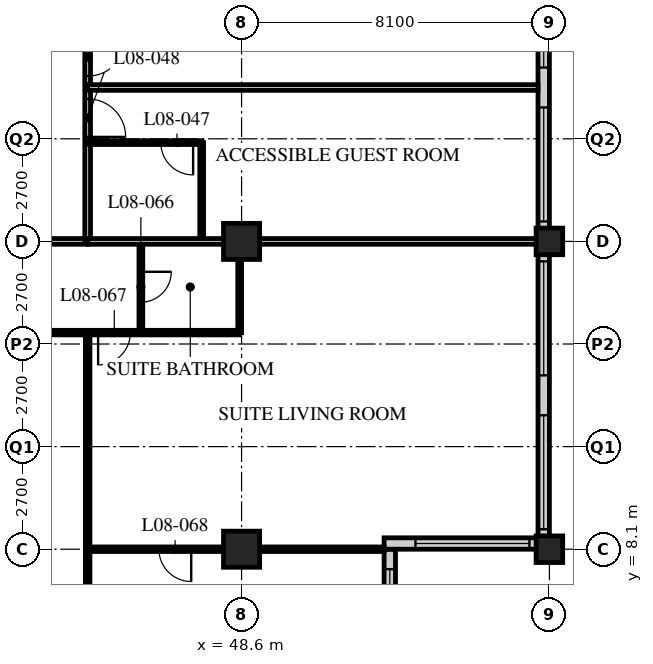
"""IFC4 building model, lengths in metres.
Left out: names, types, materials, properties, quantities, classifications, styles, units other than length and angle.
Written with IfcOpenShell. Run it as: python <this file> out.ifc"""

import sys

from ifc_helpers import new_model, si_unit, direction, frame, frame_2d, origin, origin_2d, place, context, subcontext, project, spatial, rectangle, hollow_rectangle, extrude, element, fill, save


model = new_model("IFC4")
c1 = context("Model", 3, precision=1e-05, world=origin(), true_north=direction((0.0, 1.0)))
c2 = subcontext(c1, "Body", "Model", "MODEL_VIEW")
j1 = project(units=[si_unit("LENGTHUNIT", "METRE"), si_unit("PLANEANGLEUNIT", "RADIAN")], contexts=[c1])
p1 = place(None, origin())
s1 = spatial("IfcSite", under=j1, at=p1, CompositionType="ELEMENT")
p2 = place(p1, origin())
s2 = spatial("IfcBuilding", under=s1, at=p2, CompositionType="ELEMENT")
p3 = place(p2, frame((0.0, 0.0, 39.8)))
s3 = spatial("IfcBuildingStorey", under=s2, at=p3, CompositionType="ELEMENT", Elevation=39.8)
for number, where, z_axis, x_axis in (
    (1, (48.6, 8.1, 0.0), (0.0, 0.0, 1.0), (1.0, 0.0, 0.0)),
    (2, (48.6, 16.2, 0.0), (0.0, 0.0, 1.0), (1.0, 0.0, 0.0)),
):
    element("IfcColumn", number, at=place(p3, frame(where, z_axis=z_axis, x_axis=x_axis)), inside=s3, PredefinedType="COLUMN", context=c2, shape_type="SweptSolid", body=[
        extrude(hollow_rectangle(XDim=0.95, YDim=0.95, WallThickness=0.095, at=origin_2d()), origin(), (0.0, 0.0, 1.0), 3.4),
    ])
for number, where, z_axis, x_axis in (
    (3, (56.7, 8.1, 0.0), (0.0, 0.0, 1.0), (1.0, 0.0, 0.0)),
    (4, (56.7, 16.2, 0.0), (0.0, 0.0, 1.0), (1.0, 0.0, 0.0)),
):
    element("IfcColumn", number, at=place(p3, frame(where, z_axis=z_axis, x_axis=x_axis)), inside=s3, PredefinedType="COLUMN", context=c2, shape_type="SweptSolid", body=[
        extrude(hollow_rectangle(XDim=0.7, YDim=0.7, WallThickness=0.06, at=origin_2d()), origin(), (0.0, 0.0, 1.0), 3.4),
    ])
p4 = place(p3, frame((52.5, 4.35, 0.0), z_axis=(0.0, 0.0, 1.0), x_axis=(0.0, 1.0, 0.0)))
e5 = element("IfcWall", 5, at=p4, inside=s3, PredefinedType="SOLIDWALL", context=c2, shape_type="SweptSolid", body=[
    extrude(rectangle(XDim=3.75, YDim=0.3, at=frame_2d((1.875, 0.0))), origin(), (0.0, 0.0, 1.0), 3.19),
])
p5 = place(p4, frame((0.225, 0.0, 0.9)))
e6 = element("IfcOpeningElement", 6, at=p5, cuts=e5, PredefinedType="OPENING", context=c2, shape_type="SweptSolid", body=[
    extrude(rectangle(XDim=3.0, YDim=1.5, at=frame_2d((1.5, 0.75))), frame((0.0, 0.16, 0.0), z_axis=(0.0, -1.0, 0.0), x_axis=(1.0, 0.0, 0.0)), (0.0, 0.0, 1.0), 0.32),
])
p6 = place(p3, frame((52.35, 8.25, 0.0), z_axis=(0.0, 0.0, 1.0), x_axis=(1.0, 0.0, 0.0)))
e7 = element("IfcWall", 7, at=p6, inside=s3, PredefinedType="SOLIDWALL", context=c2, shape_type="SweptSolid", body=[
    extrude(rectangle(XDim=4.35, YDim=0.3, at=frame_2d((2.175, 0.0))), origin(), (0.0, 0.0, 1.0), 3.19),
])
p7 = place(p6, frame((0.825, 0.0, 0.9)))
e8 = element("IfcOpeningElement", 8, at=p7, cuts=e7, PredefinedType="OPENING", context=c2, shape_type="SweptSolid", body=[
    extrude(rectangle(XDim=3.0, YDim=1.5, at=frame_2d((1.5, 0.75))), frame((0.0, 0.16, 0.0), z_axis=(0.0, -1.0, 0.0), x_axis=(1.0, 0.0, 0.0)), (0.0, 0.0, 1.0), 0.32),
])
p8 = place(p3, frame((56.55, 8.4, 0.0), z_axis=(0.0, 0.0, 1.0), x_axis=(0.0, 1.0, 0.0)))
e9 = element("IfcWall", 9, at=p8, inside=s3, PredefinedType="SOLIDWALL", context=c2, shape_type="SweptSolid", body=[
    extrude(rectangle(XDim=32.1, YDim=0.3, at=frame_2d((16.05, 0.0))), origin(), (0.0, 0.0, 1.0), 3.19),
])
p9 = place(p8, frame((0.225, 0.0, 0.9)))
e10 = element("IfcOpeningElement", 10, at=p9, cuts=e9, PredefinedType="OPENING", context=c2, shape_type="SweptSolid", body=[
    extrude(rectangle(XDim=3.0, YDim=2.0, at=frame_2d((1.5, 1.0))), frame((0.0, 0.16, 0.0), z_axis=(0.0, -1.0, 0.0), x_axis=(1.0, 0.0, 0.0)), (0.0, 0.0, 1.0), 0.32),
])
p10 = place(p8, frame((4.275, 0.0, 0.9)))
e11 = element("IfcOpeningElement", 11, at=p10, cuts=e9, PredefinedType="OPENING", context=c2, shape_type="SweptSolid", body=[
    extrude(rectangle(XDim=3.0, YDim=2.0, at=frame_2d((1.5, 1.0))), frame((0.0, 0.16, 0.0), z_axis=(0.0, -1.0, 0.0), x_axis=(1.0, 0.0, 0.0)), (0.0, 0.0, 1.0), 0.32),
])
p11 = place(p8, frame((8.325, 0.0, 0.9)))
e12 = element("IfcOpeningElement", 12, at=p11, cuts=e9, PredefinedType="OPENING", context=c2, shape_type="SweptSolid", body=[
    extrude(rectangle(XDim=3.0, YDim=2.0, at=frame_2d((1.5, 1.0))), frame((0.0, 0.16, 0.0), z_axis=(0.0, -1.0, 0.0), x_axis=(1.0, 0.0, 0.0)), (0.0, 0.0, 1.0), 0.32),
])
p12 = place(p8, frame((12.375, 0.0, 0.9)))
e13 = element("IfcOpeningElement", 13, at=p12, cuts=e9, PredefinedType="OPENING", context=c2, shape_type="SweptSolid", body=[
    extrude(rectangle(XDim=3.0, YDim=2.0, at=frame_2d((1.5, 1.0))), frame((0.0, 0.16, 0.0), z_axis=(0.0, -1.0, 0.0), x_axis=(1.0, 0.0, 0.0)), (0.0, 0.0, 1.0), 0.32),
])
p13 = place(p8, frame((16.425, 0.0, 0.9)))
e14 = element("IfcOpeningElement", 14, at=p13, cuts=e9, PredefinedType="OPENING", context=c2, shape_type="SweptSolid", body=[
    extrude(rectangle(XDim=3.0, YDim=2.0, at=frame_2d((1.5, 1.0))), frame((0.0, 0.16, 0.0), z_axis=(0.0, -1.0, 0.0), x_axis=(1.0, 0.0, 0.0)), (0.0, 0.0, 1.0), 0.32),
])
p14 = place(p8, frame((20.475, 0.0, 0.9)))
e15 = element("IfcOpeningElement", 15, at=p14, cuts=e9, PredefinedType="OPENING", context=c2, shape_type="SweptSolid", body=[
    extrude(rectangle(XDim=3.0, YDim=2.0, at=frame_2d((1.5, 1.0))), frame((0.0, 0.16, 0.0), z_axis=(0.0, -1.0, 0.0), x_axis=(1.0, 0.0, 0.0)), (0.0, 0.0, 1.0), 0.32),
])
p15 = place(p8, frame((24.525, 0.0, 0.9)))
e16 = element("IfcOpeningElement", 16, at=p15, cuts=e9, PredefinedType="OPENING", context=c2, shape_type="SweptSolid", body=[
    extrude(rectangle(XDim=3.0, YDim=2.0, at=frame_2d((1.5, 1.0))), frame((0.0, 0.16, 0.0), z_axis=(0.0, -1.0, 0.0), x_axis=(1.0, 0.0, 0.0)), (0.0, 0.0, 1.0), 0.32),
])
p16 = place(p8, frame((28.575, 0.0, 0.9)))
e17 = element("IfcOpeningElement", 17, at=p16, cuts=e9, PredefinedType="OPENING", context=c2, shape_type="SweptSolid", body=[
    extrude(rectangle(XDim=3.0, YDim=2.0, at=frame_2d((1.5, 1.0))), frame((0.0, 0.16, 0.0), z_axis=(0.0, -1.0, 0.0), x_axis=(1.0, 0.0, 0.0)), (0.0, 0.0, 1.0), 0.32),
])
p17 = place(p3, frame((12.15, 16.2, 0.0), z_axis=(0.0, 0.0, 1.0), x_axis=(1.0, 0.0, 0.0)))
e18 = element("IfcWall", 18, at=p17, inside=s3, PredefinedType="PARTITIONING", context=c2, shape_type="SweptSolid", body=[
    extrude(rectangle(XDim=32.4, YDim=0.15, at=frame_2d((16.2, 0.0))), origin(), (0.0, 0.0, 1.0), 2.578),
])
p18 = place(p17, frame((6.5, 0.0, 0.0)))
e19 = element("IfcOpeningElement", 19, at=p18, cuts=e18, PredefinedType="OPENING", context=c2, shape_type="SweptSolid", body=[
    extrude(rectangle(XDim=1.0, YDim=2.1, at=frame_2d((0.5, 1.05))), frame((0.0, 0.085, 0.0), z_axis=(0.0, -1.0, 0.0), x_axis=(1.0, 0.0, 0.0)), (0.0, 0.0, 1.0), 0.17),
])
p19 = place(p17, frame((8.4, 0.0, 0.0)))
e20 = element("IfcOpeningElement", 20, at=p19, cuts=e18, PredefinedType="OPENING", context=c2, shape_type="SweptSolid", body=[
    extrude(rectangle(XDim=1.0, YDim=2.1, at=frame_2d((0.5, 1.05))), frame((0.0, 0.085, 0.0), z_axis=(0.0, -1.0, 0.0), x_axis=(1.0, 0.0, 0.0)), (0.0, 0.0, 1.0), 0.17),
])
p20 = place(p17, frame((14.6, 0.0, 0.0)))
e21 = element("IfcOpeningElement", 21, at=p20, cuts=e18, PredefinedType="OPENING", context=c2, shape_type="SweptSolid", body=[
    extrude(rectangle(XDim=1.0, YDim=2.1, at=frame_2d((0.5, 1.05))), frame((0.0, 0.085, 0.0), z_axis=(0.0, -1.0, 0.0), x_axis=(1.0, 0.0, 0.0)), (0.0, 0.0, 1.0), 0.17),
])
p21 = place(p17, frame((16.5, 0.0, 0.0)))
e22 = element("IfcOpeningElement", 22, at=p21, cuts=e18, PredefinedType="OPENING", context=c2, shape_type="SweptSolid", body=[
    extrude(rectangle(XDim=1.0, YDim=2.1, at=frame_2d((0.5, 1.05))), frame((0.0, 0.085, 0.0), z_axis=(0.0, -1.0, 0.0), x_axis=(1.0, 0.0, 0.0)), (0.0, 0.0, 1.0), 0.17),
])
p22 = place(p17, frame((23.0, 0.0, 0.0)))
e23 = element("IfcOpeningElement", 23, at=p22, cuts=e18, PredefinedType="OPENING", context=c2, shape_type="SweptSolid", body=[
    extrude(rectangle(XDim=1.0, YDim=2.1, at=frame_2d((0.5, 1.05))), frame((0.0, 0.085, 0.0), z_axis=(0.0, -1.0, 0.0), x_axis=(1.0, 0.0, 0.0)), (0.0, 0.0, 1.0), 0.17),
])
p23 = place(p17, frame((24.6, 0.0, 0.0)))
e24 = element("IfcOpeningElement", 24, at=p23, cuts=e18, PredefinedType="OPENING", context=c2, shape_type="SweptSolid", body=[
    extrude(rectangle(XDim=1.0, YDim=2.1, at=frame_2d((0.5, 1.05))), frame((0.0, 0.085, 0.0), z_axis=(0.0, -1.0, 0.0), x_axis=(1.0, 0.0, 0.0)), (0.0, 0.0, 1.0), 0.17),
])
p24 = place(p17, frame((1.525, 0.0, 0.0)))
e25 = element("IfcOpeningElement", 25, at=p24, cuts=e18, PredefinedType="OPENING", context=c2, shape_type="SweptSolid", body=[
    extrude(rectangle(XDim=1.0, YDim=2.1, at=frame_2d((0.5, 1.05))), frame((0.0, 0.085, 0.0), z_axis=(0.0, -1.0, 0.0), x_axis=(1.0, 0.0, 0.0)), (0.0, 0.0, 1.0), 0.17),
])
p25 = place(p17, frame((29.875, 0.0, 0.0)))
e26 = element("IfcOpeningElement", 26, at=p25, cuts=e18, PredefinedType="OPENING", context=c2, shape_type="SweptSolid", body=[
    extrude(rectangle(XDim=1.0, YDim=2.1, at=frame_2d((0.5, 1.05))), frame((0.0, 0.085, 0.0), z_axis=(0.0, -1.0, 0.0), x_axis=(1.0, 0.0, 0.0)), (0.0, 0.0, 1.0), 0.17),
])
p26 = place(p3, frame((44.55, 16.2, 0.0), z_axis=(0.0, 0.0, 1.0), x_axis=(0.0, 1.0, 0.0)))
e27 = element("IfcWall", 27, at=p26, inside=s3, PredefinedType="PARTITIONING", context=c2, shape_type="SweptSolid", body=[
    extrude(rectangle(XDim=26.1, YDim=0.15, at=frame_2d((13.05, 0.0))), origin(), (0.0, 0.0, 1.0), 3.19),
])
p27 = place(p26, frame((2.75, 0.0, 0.0)))
e28 = element("IfcOpeningElement", 28, at=p27, cuts=e27, PredefinedType="OPENING", context=c2, shape_type="SweptSolid", body=[
    extrude(rectangle(XDim=1.0, YDim=2.1, at=frame_2d((0.5, 1.05))), frame((0.0, 0.085, 0.0), z_axis=(0.0, -1.0, 0.0), x_axis=(1.0, 0.0, 0.0)), (0.0, 0.0, 1.0), 0.17),
])
p28 = place(p26, frame((4.35, 0.0, 0.0)))
e29 = element("IfcOpeningElement", 29, at=p28, cuts=e27, PredefinedType="OPENING", context=c2, shape_type="SweptSolid", body=[
    extrude(rectangle(XDim=1.0, YDim=2.1, at=frame_2d((0.5, 1.05))), frame((0.0, 0.085, 0.0), z_axis=(0.0, -1.0, 0.0), x_axis=(1.0, 0.0, 0.0)), (0.0, 0.0, 1.0), 0.17),
])
p29 = place(p26, frame((8.4, 0.0, 0.0)))
e30 = element("IfcOpeningElement", 30, at=p29, cuts=e27, PredefinedType="OPENING", context=c2, shape_type="SweptSolid", body=[
    extrude(rectangle(XDim=1.0, YDim=2.1, at=frame_2d((0.5, 1.05))), frame((0.0, 0.085, 0.0), z_axis=(0.0, -1.0, 0.0), x_axis=(1.0, 0.0, 0.0)), (0.0, 0.0, 1.0), 0.17),
])
p30 = place(p26, frame((14.6, 0.0, 0.0)))
e31 = element("IfcOpeningElement", 31, at=p30, cuts=e27, PredefinedType="OPENING", context=c2, shape_type="SweptSolid", body=[
    extrude(rectangle(XDim=1.0, YDim=2.1, at=frame_2d((0.5, 1.05))), frame((0.0, 0.085, 0.0), z_axis=(0.0, -1.0, 0.0), x_axis=(1.0, 0.0, 0.0)), (0.0, 0.0, 1.0), 0.17),
])
p31 = place(p26, frame((18.65, 0.0, 0.0)))
e32 = element("IfcOpeningElement", 32, at=p31, cuts=e27, PredefinedType="OPENING", context=c2, shape_type="SweptSolid", body=[
    extrude(rectangle(XDim=1.0, YDim=2.1, at=frame_2d((0.5, 1.05))), frame((0.0, 0.085, 0.0), z_axis=(0.0, -1.0, 0.0), x_axis=(1.0, 0.0, 0.0)), (0.0, 0.0, 1.0), 0.17),
])
p32 = place(p26, frame((22.65, 0.0, 0.0)))
e33 = element("IfcOpeningElement", 33, at=p32, cuts=e27, PredefinedType="OPENING", context=c2, shape_type="SweptSolid", body=[
    extrude(rectangle(XDim=1.0, YDim=2.1, at=frame_2d((0.5, 1.05))), frame((0.0, 0.085, 0.0), z_axis=(0.0, -1.0, 0.0), x_axis=(1.0, 0.0, 0.0)), (0.0, 0.0, 1.0), 0.17),
])
p33 = place(p3, frame((47.55, 16.2, 0.0), z_axis=(0.0, 0.0, 1.0), x_axis=(0.0, 1.0, 0.0)))
e34 = element("IfcWall", 34, at=p33, inside=s3, PredefinedType="PARTITIONING", context=c2, shape_type="SweptSolid", body=[
    extrude(rectangle(XDim=2.6, YDim=0.1, at=frame_2d((1.3, 0.0))), origin(), (0.0, 0.0, 1.0), 3.19),
])
p34 = place(p3, frame((44.55, 18.8, 0.0), z_axis=(0.0, 0.0, 1.0), x_axis=(1.0, 0.0, 0.0)))
e35 = element("IfcWall", 35, at=p34, inside=s3, PredefinedType="PARTITIONING", context=c2, shape_type="SweptSolid", body=[
    extrude(rectangle(XDim=3.0, YDim=0.1, at=frame_2d((1.5, 0.0))), origin(), (0.0, 0.0, 1.0), 3.19),
])
p35 = place(p34, frame((1.925, 0.0, 0.0)))
e36 = element("IfcOpeningElement", 36, at=p35, cuts=e35, PredefinedType="OPENING", context=c2, shape_type="SweptSolid", body=[
    extrude(rectangle(XDim=0.85, YDim=2.1, at=frame_2d((0.425, 1.05))), frame((0.0, 0.06, 0.0), z_axis=(0.0, -1.0, 0.0), x_axis=(1.0, 0.0, 0.0)), (0.0, 0.0, 1.0), 0.12),
])
p36 = place(p3, frame((44.55, 20.25, 0.0), z_axis=(0.0, 0.0, 1.0), x_axis=(1.0, 0.0, 0.0)))
e37 = element("IfcWall", 37, at=p36, inside=s3, PredefinedType="PARTITIONING", context=c2, shape_type="SweptSolid", body=[
    extrude(rectangle(XDim=11.85, YDim=0.15, at=frame_2d((5.925, 0.0))), origin(), (0.0, 0.0, 1.0), 3.19),
])
p37 = place(p3, frame((40.5, 13.8, 0.0), z_axis=(0.0, 0.0, 1.0), x_axis=(1.0, 0.0, 0.0)))
e38 = element("IfcWall", 38, at=p37, inside=s3, PredefinedType="PARTITIONING", context=c2, shape_type="SweptSolid", body=[
    extrude(rectangle(XDim=8.05, YDim=0.12, at=frame_2d((4.025, 0.0))), origin(), (0.0, 0.0, 1.0), 3.19),
])
p38 = place(p37, frame((0.475, 0.0, 0.0)))
e39 = element("IfcOpeningElement", 39, at=p38, cuts=e38, PredefinedType="OPENING", context=c2, shape_type="SweptSolid", body=[
    extrude(rectangle(XDim=0.85, YDim=2.1, at=frame_2d((0.425, 1.05))), frame((0.0, 0.07, 0.0), z_axis=(0.0, -1.0, 0.0), x_axis=(1.0, 0.0, 0.0)), (0.0, 0.0, 1.0), 0.14),
])
p39 = place(p37, frame((4.325, 0.0, 0.0)))
e40 = element("IfcOpeningElement", 40, at=p39, cuts=e38, PredefinedType="OPENING", context=c2, shape_type="SweptSolid", body=[
    extrude(rectangle(XDim=0.85, YDim=2.1, at=frame_2d((0.425, 1.05))), frame((0.0, 0.07, 0.0), z_axis=(0.0, -1.0, 0.0), x_axis=(1.0, 0.0, 0.0)), (0.0, 0.0, 1.0), 0.14),
])
p40 = place(p3, frame((45.95, 16.2, 0.0), z_axis=(0.0, 0.0, 1.0), x_axis=(0.0, -1.0, 0.0)))
e41 = element("IfcWall", 41, at=p40, inside=s3, PredefinedType="PARTITIONING", context=c2, shape_type="SweptSolid", body=[
    extrude(rectangle(XDim=2.4, YDim=0.1, at=frame_2d((1.2, 0.0))), origin(), (0.0, 0.0, 1.0), 3.19),
])
p41 = place(p40, frame((0.8, 0.0, 0.0)))
e42 = element("IfcOpeningElement", 42, at=p41, cuts=e41, PredefinedType="OPENING", context=c2, shape_type="SweptSolid", body=[
    extrude(rectangle(XDim=0.8, YDim=2.1, at=frame_2d((0.4, 1.05))), frame((0.0, 0.06, 0.0), z_axis=(0.0, -1.0, 0.0), x_axis=(1.0, 0.0, 0.0)), (0.0, 0.0, 1.0), 0.12),
])
p42 = place(p3, frame((48.55, 16.2, 0.0), z_axis=(0.0, 0.0, 1.0), x_axis=(0.0, -1.0, 0.0)))
e43 = element("IfcWall", 43, at=p42, inside=s3, PredefinedType="PARTITIONING", context=c2, shape_type="SweptSolid", body=[
    extrude(rectangle(XDim=2.4, YDim=0.1, at=frame_2d((1.2, 0.0))), origin(), (0.0, 0.0, 1.0), 2.578),
])
p43 = place(p3, frame((44.55, 13.8, 0.0), z_axis=(0.0, 0.0, 1.0), x_axis=(0.0, -1.0, 0.0)))
e44 = element("IfcWall", 44, at=p43, inside=s3, PredefinedType="PARTITIONING", context=c2, shape_type="SweptSolid", body=[
    extrude(rectangle(XDim=13.5, YDim=0.12, at=frame_2d((6.75, 0.0))), origin(), (0.0, 0.0, 1.0), 3.19),
])
p44 = place(p3, frame((44.55, 8.1, 0.0), z_axis=(0.0, 0.0, 1.0), x_axis=(1.0, 0.0, 0.0)))
e45 = element("IfcWall", 45, at=p44, inside=s3, PredefinedType="PARTITIONING", context=c2, shape_type="SweptSolid", body=[
    extrude(rectangle(XDim=7.8, YDim=0.12, at=frame_2d((3.9, 0.0))), origin(), (0.0, 0.0, 1.0), 2.578),
])
p45 = place(p44, frame((1.875, 0.0, 0.0)))
e46 = element("IfcOpeningElement", 46, at=p45, cuts=e45, PredefinedType="OPENING", context=c2, shape_type="SweptSolid", body=[
    extrude(rectangle(XDim=0.85, YDim=2.1, at=frame_2d((0.425, 1.05))), frame((0.0, 0.07, 0.0), z_axis=(0.0, -1.0, 0.0), x_axis=(1.0, 0.0, 0.0)), (0.0, 0.0, 1.0), 0.14),
])
p46 = place(p3, frame((44.55, 16.2, 0.0), z_axis=(0.0, 0.0, 1.0), x_axis=(1.0, 0.0, 0.0)))
e47 = element("IfcWall", 47, at=p46, inside=s3, PredefinedType="PARTITIONING", context=c2, shape_type="SweptSolid", body=[
    extrude(rectangle(XDim=11.85, YDim=0.15, at=frame_2d((5.925, 0.0))), origin(), (0.0, 0.0, 1.0), 2.578),
])
p47 = place(p5, origin())
e48 = element("IfcWindow", 48, at=p47, inside=s3, PartitioningType="SINGLE_PANEL", PredefinedType="WINDOW", context=c2, shape_type="SweptSolid", body=[
    extrude(rectangle(XDim=3.0, YDim=1.5, at=frame_2d((1.5, 0.75))), frame((0.0, 0.03, 0.0), z_axis=(0.0, -1.0, 0.0), x_axis=(1.0, 0.0, 0.0)), (0.0, 0.0, 1.0), 0.06),
])
fill(e6, e48)
p48 = place(p7, origin())
e49 = element("IfcWindow", 49, at=p48, inside=s3, PartitioningType="SINGLE_PANEL", PredefinedType="WINDOW", context=c2, shape_type="SweptSolid", body=[
    extrude(rectangle(XDim=3.0, YDim=1.5, at=frame_2d((1.5, 0.75))), frame((0.0, 0.03, 0.0), z_axis=(0.0, -1.0, 0.0), x_axis=(1.0, 0.0, 0.0)), (0.0, 0.0, 1.0), 0.06),
])
fill(e8, e49)
p49 = place(p9, origin())
e50 = element("IfcWindow", 50, at=p49, inside=s3, PartitioningType="SINGLE_PANEL", PredefinedType="WINDOW", context=c2, shape_type="SweptSolid", body=[
    extrude(rectangle(XDim=3.0, YDim=2.0, at=frame_2d((1.5, 1.0))), frame((0.0, 0.03, 0.0), z_axis=(0.0, -1.0, 0.0), x_axis=(1.0, 0.0, 0.0)), (0.0, 0.0, 1.0), 0.06),
])
fill(e10, e50)
p50 = place(p10, origin())
e51 = element("IfcWindow", 51, at=p50, inside=s3, PartitioningType="SINGLE_PANEL", PredefinedType="WINDOW", context=c2, shape_type="SweptSolid", body=[
    extrude(rectangle(XDim=3.0, YDim=2.0, at=frame_2d((1.5, 1.0))), frame((0.0, 0.03, 0.0), z_axis=(0.0, -1.0, 0.0), x_axis=(1.0, 0.0, 0.0)), (0.0, 0.0, 1.0), 0.06),
])
fill(e11, e51)
p51 = place(p11, origin())
e52 = element("IfcWindow", 52, at=p51, inside=s3, PartitioningType="SINGLE_PANEL", PredefinedType="WINDOW", context=c2, shape_type="SweptSolid", body=[
    extrude(rectangle(XDim=3.0, YDim=2.0, at=frame_2d((1.5, 1.0))), frame((0.0, 0.03, 0.0), z_axis=(0.0, -1.0, 0.0), x_axis=(1.0, 0.0, 0.0)), (0.0, 0.0, 1.0), 0.06),
])
fill(e12, e52)
p52 = place(p12, origin())
e53 = element("IfcWindow", 53, at=p52, inside=s3, PartitioningType="SINGLE_PANEL", PredefinedType="WINDOW", context=c2, shape_type="SweptSolid", body=[
    extrude(rectangle(XDim=3.0, YDim=2.0, at=frame_2d((1.5, 1.0))), frame((0.0, 0.03, 0.0), z_axis=(0.0, -1.0, 0.0), x_axis=(1.0, 0.0, 0.0)), (0.0, 0.0, 1.0), 0.06),
])
fill(e13, e53)
p53 = place(p35, origin())
e54 = element("IfcDoor", 54, at=p53, inside=s3, OperationType="SINGLE_SWING_LEFT", PredefinedType="DOOR", context=c2, shape_type="SweptSolid", body=[
    extrude(rectangle(XDim=0.85, YDim=2.1, at=frame_2d((0.425, 1.05))), frame((0.0, 0.025, 0.0), z_axis=(0.0, -1.0, 0.0), x_axis=(1.0, 0.0, 0.0)), (0.0, 0.0, 1.0), 0.05),
])
fill(e36, e54)
p54 = place(p27, origin())
e55 = element("IfcDoor", 55, at=p54, inside=s3, OperationType="SINGLE_SWING_RIGHT", PredefinedType="DOOR", context=c2, shape_type="SweptSolid", body=[
    extrude(rectangle(XDim=1.0, YDim=2.1, at=frame_2d((0.5, 1.05))), frame((0.0, 0.025, 0.0), z_axis=(0.0, -1.0, 0.0), x_axis=(1.0, 0.0, 0.0)), (0.0, 0.0, 1.0), 0.05),
])
fill(e28, e55)
p55 = place(p28, origin())
e56 = element("IfcDoor", 56, at=p55, inside=s3, OperationType="SINGLE_SWING_LEFT", PredefinedType="DOOR", context=c2, shape_type="SweptSolid", body=[
    extrude(rectangle(XDim=1.0, YDim=2.1, at=frame_2d((0.5, 1.05))), frame((0.0, 0.025, 0.0), z_axis=(0.0, -1.0, 0.0), x_axis=(1.0, 0.0, 0.0)), (0.0, 0.0, 1.0), 0.05),
])
fill(e29, e56)
p56 = place(p41, origin())
e57 = element("IfcDoor", 57, at=p56, inside=s3, OperationType="SINGLE_SWING_LEFT", PredefinedType="DOOR", context=c2, shape_type="SweptSolid", body=[
    extrude(rectangle(XDim=0.8, YDim=2.1, at=frame_2d((0.4, 1.05))), frame((0.0, 0.025, 0.0), z_axis=(0.0, -1.0, 0.0), x_axis=(1.0, 0.0, 0.0)), (0.0, 0.0, 1.0), 0.05),
])
fill(e42, e57)
p57 = place(p39, origin())
e58 = element("IfcDoor", 58, at=p57, inside=s3, OperationType="SINGLE_SWING_RIGHT", PredefinedType="DOOR", context=c2, shape_type="SweptSolid", body=[
    extrude(rectangle(XDim=0.85, YDim=2.1, at=frame_2d((0.425, 1.05))), frame((0.0, 0.025, 0.0), z_axis=(0.0, -1.0, 0.0), x_axis=(1.0, 0.0, 0.0)), (0.0, 0.0, 1.0), 0.05),
])
fill(e40, e58)
p58 = place(p45, origin())
e59 = element("IfcDoor", 59, at=p58, inside=s3, OperationType="SINGLE_SWING_LEFT", PredefinedType="DOOR", context=c2, shape_type="SweptSolid", body=[
    extrude(rectangle(XDim=0.85, YDim=2.1, at=frame_2d((0.425, 1.05))), frame((0.0, 0.025, 0.0), z_axis=(0.0, -1.0, 0.0), x_axis=(1.0, 0.0, 0.0)), (0.0, 0.0, 1.0), 0.05),
])
fill(e46, e59)
save(model, sys.argv[1])
